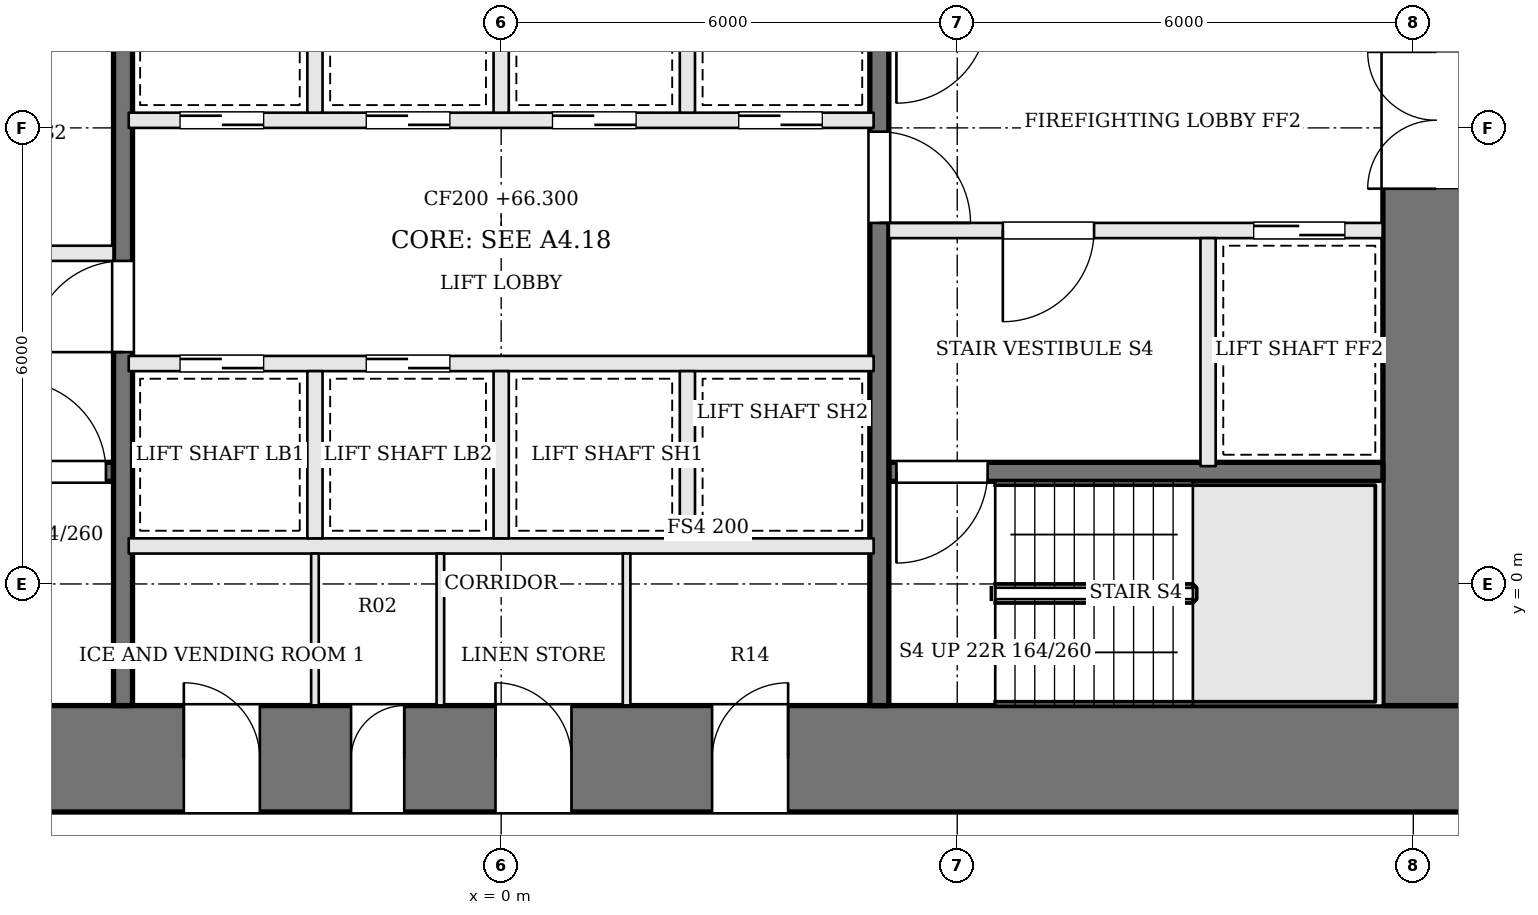
"""IFC4 building model, lengths in metres.
Left out: names, types, materials, properties, quantities, classifications, styles, units other than length and angle.
Written with IfcOpenShell. Run it as: python <this file> out.ifc"""

import sys

from ifc_helpers import new_model, si_unit, direction, frame, frame_2d, origin, place, context, subcontext, project, spatial, rectangle, extrude, element, fill, save


model = new_model("IFC4")
c1 = context("Model", 3, precision=1e-05, world=origin(), true_north=direction((0.0, 1.0)))
c2 = subcontext(c1, "Body", "Model", "MODEL_VIEW")
j1 = project(units=[si_unit("LENGTHUNIT", "METRE"), si_unit("PLANEANGLEUNIT", "RADIAN")], contexts=[c1])
p1 = place(None, origin())
s1 = spatial("IfcSite", under=j1, at=p1, CompositionType="ELEMENT")
p2 = place(p1, origin())
s2 = spatial("IfcBuilding", under=s1, at=p2, CompositionType="ELEMENT")
p3 = place(p2, frame((0.0, 0.0, 66.3)))
s3 = spatial("IfcBuildingStorey", under=s2, at=p3, CompositionType="ELEMENT", Elevation=66.3)
p4 = place(p3, frame((-13.0, -2.3, 0.0), z_axis=(0.0, 0.0, 1.0), x_axis=(1.0, 0.0, 0.0)))
e1 = element("IfcWall", 1, at=p4, inside=s3, PredefinedType="SHEAR", context=c2, shape_type="SweptSolid", body=[
    extrude(rectangle(XDim=26.0, YDim=1.4, at=frame_2d((13.0, 0.0))), origin(), (0.0, 0.0, 1.0), 3.6),
])
p5 = place(p4, frame((8.825, 0.0, 0.0)))
e2 = element("IfcOpeningElement", 2, at=p5, cuts=e1, PredefinedType="OPENING", context=c2, shape_type="SweptSolid", body=[
    extrude(rectangle(XDim=1.0, YDim=2.1, at=frame_2d((0.5, 1.05))), frame((0.0, 0.71, 0.0), z_axis=(0.0, -1.0, 0.0), x_axis=(1.0, 0.0, 0.0)), (0.0, 0.0, 1.0), 1.42),
])
p6 = place(p4, frame((11.025, 0.0, 0.0)))
e3 = element("IfcOpeningElement", 3, at=p6, cuts=e1, PredefinedType="OPENING", context=c2, shape_type="SweptSolid", body=[
    extrude(rectangle(XDim=0.7, YDim=2.1, at=frame_2d((0.35, 1.05))), frame((0.0, 0.71, 0.0), z_axis=(0.0, -1.0, 0.0), x_axis=(1.0, 0.0, 0.0)), (0.0, 0.0, 1.0), 1.42),
])
p7 = place(p4, frame((12.925, 0.0, 0.0)))
e4 = element("IfcOpeningElement", 4, at=p7, cuts=e1, PredefinedType="OPENING", context=c2, shape_type="SweptSolid", body=[
    extrude(rectangle(XDim=1.0, YDim=2.1, at=frame_2d((0.5, 1.05))), frame((0.0, 0.71, 0.0), z_axis=(0.0, -1.0, 0.0), x_axis=(1.0, 0.0, 0.0)), (0.0, 0.0, 1.0), 1.42),
])
p8 = place(p4, frame((15.775, 0.0, 0.0)))
e5 = element("IfcOpeningElement", 5, at=p8, cuts=e1, PredefinedType="OPENING", context=c2, shape_type="SweptSolid", body=[
    extrude(rectangle(XDim=1.0, YDim=2.1, at=frame_2d((0.5, 1.05))), frame((0.0, 0.71, 0.0), z_axis=(0.0, -1.0, 0.0), x_axis=(1.0, 0.0, 0.0)), (0.0, 0.0, 1.0), 1.42),
])
p9 = place(p3, frame((12.3, -1.6, 0.0), z_axis=(0.0, 0.0, 1.0), x_axis=(0.0, 1.0, 0.0)))
e6 = element("IfcWall", 6, at=p9, inside=s3, PredefinedType="SHEAR", context=c2, shape_type="SweptSolid", body=[
    extrude(rectangle(XDim=12.2, YDim=1.4, at=frame_2d((6.1, 0.0))), origin(), (0.0, 0.0, 1.0), 3.6),
])
p10 = place(p9, frame((6.8, 0.0, 0.0)))
e7 = element("IfcOpeningElement", 7, at=p10, cuts=e6, PredefinedType="OPENING", context=c2, shape_type="SweptSolid", body=[
    extrude(rectangle(XDim=1.8, YDim=2.1, at=frame_2d((0.9, 1.05))), frame((0.0, 0.71, 0.0), z_axis=(0.0, -1.0, 0.0), x_axis=(1.0, 0.0, 0.0)), (0.0, 0.0, 1.0), 1.42),
])
p11 = place(p3, frame((-11.6, 1.475, 0.0), z_axis=(0.0, 0.0, 1.0), x_axis=(1.0, 0.0, 0.0)))
e8 = element("IfcWall", 8, at=p11, inside=s3, PredefinedType="SOLIDWALL", context=c2, shape_type="SweptSolid", body=[
    extrude(rectangle(XDim=6.5, YDim=0.25, at=frame_2d((3.25, 0.0))), origin(), (0.0, 0.0, 1.0), 3.4),
])
p12 = place(p11, frame((5.2, 0.0, 0.0)))
e9 = element("IfcOpeningElement", 9, at=p12, cuts=e8, PredefinedType="OPENING", context=c2, shape_type="SweptSolid", body=[
    extrude(rectangle(XDim=1.2, YDim=2.1, at=frame_2d((0.6, 1.05))), frame((0.0, 0.135, 0.0), z_axis=(0.0, -1.0, 0.0), x_axis=(1.0, 0.0, 0.0)), (0.0, 0.0, 1.0), 0.27),
])
p13 = place(p3, frame((-11.6, 4.35, 0.0), z_axis=(0.0, 0.0, 1.0), x_axis=(1.0, 0.0, 0.0)))
e10 = element("IfcWall", 10, at=p13, inside=s3, PredefinedType="SOLIDWALL", context=c2, shape_type="SweptSolid", body=[
    extrude(rectangle(XDim=6.5, YDim=0.2, at=frame_2d((3.25, 0.0))), origin(), (0.0, 0.0, 1.0), 3.4),
])
p14 = place(p13, frame((3.8, 0.0, 0.0)))
e11 = element("IfcOpeningElement", 11, at=p14, cuts=e10, PredefinedType="OPENING", context=c2, shape_type="SweptSolid", body=[
    extrude(rectangle(XDim=1.2, YDim=2.1, at=frame_2d((0.6, 1.05))), frame((0.0, 0.11, 0.0), z_axis=(0.0, -1.0, 0.0), x_axis=(1.0, 0.0, 0.0)), (0.0, 0.0, 1.0), 0.22),
])
p15 = place(p13, frame((0.5, 0.0, 0.0)))
e12 = element("IfcOpeningElement", 12, at=p15, cuts=e10, PredefinedType="OPENING", context=c2, shape_type="SweptSolid", body=[
    extrude(rectangle(XDim=1.2, YDim=2.1, at=frame_2d((0.6, 1.05))), frame((0.0, 0.11, 0.0), z_axis=(0.0, -1.0, 0.0), x_axis=(1.0, 0.0, 0.0)), (0.0, 0.0, 1.0), 0.22),
])
p16 = place(p3, frame((11.6, 4.65, 0.0), z_axis=(0.0, 0.0, 1.0), x_axis=(-1.0, 0.0, 0.0)))
e13 = element("IfcWall", 13, at=p16, inside=s3, PredefinedType="SOLIDWALL", context=c2, shape_type="SweptSolid", body=[
    extrude(rectangle(XDim=6.5, YDim=0.2, at=frame_2d((3.25, 0.0))), origin(), (0.0, 0.0, 1.0), 3.4),
])
p17 = place(p16, frame((3.8, 0.0, 0.0)))
e14 = element("IfcOpeningElement", 14, at=p17, cuts=e13, PredefinedType="OPENING", context=c2, shape_type="SweptSolid", body=[
    extrude(rectangle(XDim=1.2, YDim=2.1, at=frame_2d((0.6, 1.05))), frame((0.0, 0.11, 0.0), z_axis=(0.0, -1.0, 0.0), x_axis=(1.0, 0.0, 0.0)), (0.0, 0.0, 1.0), 0.22),
])
p18 = place(p16, frame((0.5, 0.0, 0.0)))
e15 = element("IfcOpeningElement", 15, at=p18, cuts=e13, PredefinedType="OPENING", context=c2, shape_type="SweptSolid", body=[
    extrude(rectangle(XDim=1.2, YDim=2.1, at=frame_2d((0.6, 1.05))), frame((0.0, 0.11, 0.0), z_axis=(0.0, -1.0, 0.0), x_axis=(1.0, 0.0, 0.0)), (0.0, 0.0, 1.0), 0.22),
])
p19 = place(p3, frame((11.6, 1.475, 0.0), z_axis=(0.0, 0.0, 1.0), x_axis=(-1.0, 0.0, 0.0)))
e16 = element("IfcWall", 16, at=p19, inside=s3, PredefinedType="SOLIDWALL", context=c2, shape_type="SweptSolid", body=[
    extrude(rectangle(XDim=6.5, YDim=0.25, at=frame_2d((3.25, 0.0))), origin(), (0.0, 0.0, 1.0), 3.4),
])
p20 = place(p19, frame((5.2, 0.0, 0.0)))
e17 = element("IfcOpeningElement", 17, at=p20, cuts=e16, PredefinedType="OPENING", context=c2, shape_type="SweptSolid", body=[
    extrude(rectangle(XDim=1.2, YDim=2.1, at=frame_2d((0.6, 1.05))), frame((0.0, 0.135, 0.0), z_axis=(0.0, -1.0, 0.0), x_axis=(1.0, 0.0, 0.0)), (0.0, 0.0, 1.0), 0.27),
])
p21 = place(p3, frame((9.3, 4.55, 0.0), z_axis=(0.0, 0.0, 1.0), x_axis=(0.0, -1.0, 0.0)))
e18 = element("IfcWall", 18, at=p21, inside=s3, PredefinedType="SOLIDWALL", context=c2, shape_type="SweptSolid", body=[
    extrude(rectangle(XDim=3.0, YDim=0.2, at=frame_2d((1.5, 0.0))), origin(), (0.0, 0.0, 1.0), 3.4),
])
p22 = place(p3, frame((-4.975, -1.6, 0.0), z_axis=(0.0, 0.0, 1.0), x_axis=(0.0, 1.0, 0.0)))
e19 = element("IfcWall", 19, at=p22, inside=s3, PredefinedType="SOLIDWALL", context=c2, shape_type="SweptSolid", body=[
    extrude(rectangle(XDim=12.2, YDim=0.25, at=frame_2d((6.1, 0.0))), origin(), (0.0, 0.0, 1.0), 3.4),
])
p23 = place(p22, frame((4.65, 0.0, 0.0)))
e20 = element("IfcOpeningElement", 20, at=p23, cuts=e19, PredefinedType="OPENING", context=c2, shape_type="SweptSolid", body=[
    extrude(rectangle(XDim=1.2, YDim=2.1, at=frame_2d((0.6, 1.05))), frame((0.0, 0.135, 0.0), z_axis=(0.0, -1.0, 0.0), x_axis=(1.0, 0.0, 0.0)), (0.0, 0.0, 1.0), 0.27),
])
p24 = place(p3, frame((4.975, 10.6, 0.0), z_axis=(0.0, 0.0, 1.0), x_axis=(0.0, -1.0, 0.0)))
e21 = element("IfcWall", 21, at=p24, inside=s3, PredefinedType="SOLIDWALL", context=c2, shape_type="SweptSolid", body=[
    extrude(rectangle(XDim=12.2, YDim=0.25, at=frame_2d((6.1, 0.0))), origin(), (0.0, 0.0, 1.0), 3.4),
])
p25 = place(p24, frame((4.65, 0.0, 0.0)))
e22 = element("IfcOpeningElement", 22, at=p25, cuts=e21, PredefinedType="OPENING", context=c2, shape_type="SweptSolid", body=[
    extrude(rectangle(XDim=1.2, YDim=2.1, at=frame_2d((0.6, 1.05))), frame((0.0, 0.135, 0.0), z_axis=(0.0, -1.0, 0.0), x_axis=(1.0, 0.0, 0.0)), (0.0, 0.0, 1.0), 0.27),
])
p26 = place(p3, frame((-4.9, 0.5, 0.0), z_axis=(0.0, 0.0, 1.0), x_axis=(1.0, 0.0, 0.0)))
e23 = element("IfcWall", 23, at=p26, inside=s3, PredefinedType="SOLIDWALL", context=c2, shape_type="SweptSolid", body=[
    extrude(rectangle(XDim=9.8, YDim=0.2, at=frame_2d((4.9, 0.0))), origin(), (0.0, 0.0, 1.0), 3.4),
])
p27 = place(p3, frame((-4.9, 2.9, 0.0), z_axis=(0.0, 0.0, 1.0), x_axis=(1.0, 0.0, 0.0)))
e24 = element("IfcWall", 24, at=p27, inside=s3, PredefinedType="SOLIDWALL", context=c2, shape_type="SweptSolid", body=[
    extrude(rectangle(XDim=9.8, YDim=0.2, at=frame_2d((4.9, 0.0))), origin(), (0.0, 0.0, 1.0), 3.4),
])
p28 = place(p27, frame((0.675, 0.0, 0.0)))
e25 = element("IfcOpeningElement", 25, at=p28, cuts=e24, PredefinedType="OPENING", context=c2, shape_type="SweptSolid", body=[
    extrude(rectangle(XDim=1.1, YDim=2.1, at=frame_2d((0.55, 1.05))), frame((0.0, 0.11, 0.0), z_axis=(0.0, -1.0, 0.0), x_axis=(1.0, 0.0, 0.0)), (0.0, 0.0, 1.0), 0.22),
])
p29 = place(p27, frame((3.125, 0.0, 0.0)))
e26 = element("IfcOpeningElement", 26, at=p29, cuts=e24, PredefinedType="OPENING", context=c2, shape_type="SweptSolid", body=[
    extrude(rectangle(XDim=1.1, YDim=2.1, at=frame_2d((0.55, 1.05))), frame((0.0, 0.11, 0.0), z_axis=(0.0, -1.0, 0.0), x_axis=(1.0, 0.0, 0.0)), (0.0, 0.0, 1.0), 0.22),
])
p30 = place(p3, frame((-4.9, 6.1, 0.0), z_axis=(0.0, 0.0, 1.0), x_axis=(1.0, 0.0, 0.0)))
e27 = element("IfcWall", 27, at=p30, inside=s3, PredefinedType="SOLIDWALL", context=c2, shape_type="SweptSolid", body=[
    extrude(rectangle(XDim=9.8, YDim=0.2, at=frame_2d((4.9, 0.0))), origin(), (0.0, 0.0, 1.0), 3.4),
])
p31 = place(p30, frame((0.675, 0.0, 0.0)))
e28 = element("IfcOpeningElement", 28, at=p31, cuts=e27, PredefinedType="OPENING", context=c2, shape_type="SweptSolid", body=[
    extrude(rectangle(XDim=1.1, YDim=2.1, at=frame_2d((0.55, 1.05))), frame((0.0, 0.11, 0.0), z_axis=(0.0, -1.0, 0.0), x_axis=(1.0, 0.0, 0.0)), (0.0, 0.0, 1.0), 0.22),
])
p32 = place(p30, frame((3.125, 0.0, 0.0)))
e29 = element("IfcOpeningElement", 29, at=p32, cuts=e27, PredefinedType="OPENING", context=c2, shape_type="SweptSolid", body=[
    extrude(rectangle(XDim=1.1, YDim=2.1, at=frame_2d((0.55, 1.05))), frame((0.0, 0.11, 0.0), z_axis=(0.0, -1.0, 0.0), x_axis=(1.0, 0.0, 0.0)), (0.0, 0.0, 1.0), 0.22),
])
p33 = place(p30, frame((5.575, 0.0, 0.0)))
e30 = element("IfcOpeningElement", 30, at=p33, cuts=e27, PredefinedType="OPENING", context=c2, shape_type="SweptSolid", body=[
    extrude(rectangle(XDim=1.1, YDim=2.1, at=frame_2d((0.55, 1.05))), frame((0.0, 0.11, 0.0), z_axis=(0.0, -1.0, 0.0), x_axis=(1.0, 0.0, 0.0)), (0.0, 0.0, 1.0), 0.22),
])
p34 = place(p30, frame((8.025, 0.0, 0.0)))
e31 = element("IfcOpeningElement", 31, at=p34, cuts=e27, PredefinedType="OPENING", context=c2, shape_type="SweptSolid", body=[
    extrude(rectangle(XDim=1.1, YDim=2.1, at=frame_2d((0.55, 1.05))), frame((0.0, 0.11, 0.0), z_axis=(0.0, -1.0, 0.0), x_axis=(1.0, 0.0, 0.0)), (0.0, 0.0, 1.0), 0.22),
])
for number, where, z_axis, x_axis in (
    (32, (-2.45, 0.6, 0.0), (0.0, 0.0, 1.0), (0.0, 1.0, 0.0)),
    (33, (0.0, 0.6, 0.0), (0.0, 0.0, 1.0), (0.0, 1.0, 0.0)),
    (34, (2.45, 0.6, 0.0), (0.0, 0.0, 1.0), (0.0, 1.0, 0.0)),
    (35, (-2.45, 6.2, 0.0), (0.0, 0.0, 1.0), (0.0, 1.0, 0.0)),
    (36, (0.0, 6.2, 0.0), (0.0, 0.0, 1.0), (0.0, 1.0, 0.0)),
    (37, (2.45, 6.2, 0.0), (0.0, 0.0, 1.0), (0.0, 1.0, 0.0)),
):
    element("IfcWall", number, at=place(p3, frame(where, z_axis=z_axis, x_axis=x_axis)), inside=s3, PredefinedType="SOLIDWALL", context=c2, shape_type="SweptSolid", body=[
        extrude(rectangle(XDim=2.2, YDim=0.2, at=frame_2d((1.1, 0.0))), origin(), (0.0, 0.0, 1.0), 3.4),
    ])
for number, where, z_axis, x_axis in (
    (38, (-2.45, -1.6, 0.0), (0.0, 0.0, 1.0), (0.0, 1.0, 0.0)),
    (39, (-0.8, -1.6, 0.0), (0.0, 0.0, 1.0), (0.0, 1.0, 0.0)),
    (40, (1.65, -1.6, 0.0), (0.0, 0.0, 1.0), (0.0, 1.0, 0.0)),
):
    element("IfcWall", number, at=place(p3, frame(where, z_axis=z_axis, x_axis=x_axis)), inside=s3, PredefinedType="PARTITIONING", context=c2, shape_type="SweptSolid", body=[
        extrude(rectangle(XDim=2.0, YDim=0.1, at=frame_2d((1.0, 0.0))), origin(), (0.0, 0.0, 1.0), 3.4),
    ])
p35 = place(p10, origin())
e41 = element("IfcDoor", 41, at=p35, inside=s3, OperationType="DOUBLE_DOOR_SINGLE_SWING", PredefinedType="DOOR", context=c2, shape_type="SweptSolid", body=[
    extrude(rectangle(XDim=1.8, YDim=2.1, at=frame_2d((0.9, 1.05))), frame((0.0, 0.025, 0.0), z_axis=(0.0, -1.0, 0.0), x_axis=(1.0, 0.0, 0.0)), (0.0, 0.0, 1.0), 0.05),
])
fill(e7, e41)
p36 = place(p23, origin())
e42 = element("IfcDoor", 42, at=p36, inside=s3, OperationType="SINGLE_SWING_LEFT", PredefinedType="DOOR", context=c2, shape_type="SweptSolid", body=[
    extrude(rectangle(XDim=1.2, YDim=2.1, at=frame_2d((0.6, 1.05))), frame((0.0, 0.025, 0.0), z_axis=(0.0, -1.0, 0.0), x_axis=(1.0, 0.0, 0.0)), (0.0, 0.0, 1.0), 0.05),
])
fill(e20, e42)
p37 = place(p25, origin())
e43 = element("IfcDoor", 43, at=p37, inside=s3, OperationType="SINGLE_SWING_RIGHT", PredefinedType="DOOR", context=c2, shape_type="SweptSolid", body=[
    extrude(rectangle(XDim=1.2, YDim=2.1, at=frame_2d((0.6, 1.05))), frame((0.0, 0.025, 0.0), z_axis=(0.0, -1.0, 0.0), x_axis=(1.0, 0.0, 0.0)), (0.0, 0.0, 1.0), 0.05),
])
fill(e22, e43)
p38 = place(p17, origin())
e44 = element("IfcDoor", 44, at=p38, inside=s3, OperationType="SINGLE_SWING_RIGHT", PredefinedType="DOOR", context=c2, shape_type="SweptSolid", body=[
    extrude(rectangle(XDim=1.2, YDim=2.1, at=frame_2d((0.6, 1.05))), frame((0.0, 0.025, 0.0), z_axis=(0.0, -1.0, 0.0), x_axis=(1.0, 0.0, 0.0)), (0.0, 0.0, 1.0), 0.05),
])
fill(e14, e44)
p39 = place(p12, origin())
e45 = element("IfcDoor", 45, at=p39, inside=s3, OperationType="SINGLE_SWING_LEFT", PredefinedType="DOOR", context=c2, shape_type="SweptSolid", body=[
    extrude(rectangle(XDim=1.2, YDim=2.1, at=frame_2d((0.6, 1.05))), frame((0.0, 0.025, 0.0), z_axis=(0.0, -1.0, 0.0), x_axis=(1.0, 0.0, 0.0)), (0.0, 0.0, 1.0), 0.05),
])
fill(e9, e45)
p40 = place(p20, origin())
e46 = element("IfcDoor", 46, at=p40, inside=s3, OperationType="SINGLE_SWING_RIGHT", PredefinedType="DOOR", context=c2, shape_type="SweptSolid", body=[
    extrude(rectangle(XDim=1.2, YDim=2.1, at=frame_2d((0.6, 1.05))), frame((0.0, 0.025, 0.0), z_axis=(0.0, -1.0, 0.0), x_axis=(1.0, 0.0, 0.0)), (0.0, 0.0, 1.0), 0.05),
])
fill(e17, e46)
p41 = place(p18, origin())
e47 = element("IfcDoor", 47, at=p41, inside=s3, OperationType="SLIDING_TO_RIGHT", PredefinedType="DOOR", context=c2, shape_type="SweptSolid", body=[
    extrude(rectangle(XDim=1.2, YDim=2.1, at=frame_2d((0.6, 1.05))), frame((0.0, 0.025, 0.0), z_axis=(0.0, -1.0, 0.0), x_axis=(1.0, 0.0, 0.0)), (0.0, 0.0, 1.0), 0.05),
])
fill(e15, e47)
p42 = place(p28, origin())
e48 = element("IfcDoor", 48, at=p42, inside=s3, OperationType="SLIDING_TO_RIGHT", PredefinedType="DOOR", context=c2, shape_type="SweptSolid", body=[
    extrude(rectangle(XDim=1.1, YDim=2.1, at=frame_2d((0.55, 1.05))), frame((0.0, 0.025, 0.0), z_axis=(0.0, -1.0, 0.0), x_axis=(1.0, 0.0, 0.0)), (0.0, 0.0, 1.0), 0.05),
])
fill(e25, e48)
p43 = place(p29, origin())
e49 = element("IfcDoor", 49, at=p43, inside=s3, OperationType="SLIDING_TO_LEFT", PredefinedType="DOOR", context=c2, shape_type="SweptSolid", body=[
    extrude(rectangle(XDim=1.1, YDim=2.1, at=frame_2d((0.55, 1.05))), frame((0.0, 0.025, 0.0), z_axis=(0.0, -1.0, 0.0), x_axis=(1.0, 0.0, 0.0)), (0.0, 0.0, 1.0), 0.05),
])
fill(e26, e49)
p44 = place(p31, origin())
e50 = element("IfcDoor", 50, at=p44, inside=s3, OperationType="SLIDING_TO_RIGHT", PredefinedType="DOOR", context=c2, shape_type="SweptSolid", body=[
    extrude(rectangle(XDim=1.1, YDim=2.1, at=frame_2d((0.55, 1.05))), frame((0.0, 0.025, 0.0), z_axis=(0.0, -1.0, 0.0), x_axis=(1.0, 0.0, 0.0)), (0.0, 0.0, 1.0), 0.05),
])
fill(e28, e50)
p45 = place(p32, origin())
e51 = element("IfcDoor", 51, at=p45, inside=s3, OperationType="SLIDING_TO_LEFT", PredefinedType="DOOR", context=c2, shape_type="SweptSolid", body=[
    extrude(rectangle(XDim=1.1, YDim=2.1, at=frame_2d((0.55, 1.05))), frame((0.0, 0.025, 0.0), z_axis=(0.0, -1.0, 0.0), x_axis=(1.0, 0.0, 0.0)), (0.0, 0.0, 1.0), 0.05),
])
fill(e29, e51)
p46 = place(p33, origin())
e52 = element("IfcDoor", 52, at=p46, inside=s3, OperationType="SLIDING_TO_RIGHT", PredefinedType="DOOR", context=c2, shape_type="SweptSolid", body=[
    extrude(rectangle(XDim=1.1, YDim=2.1, at=frame_2d((0.55, 1.05))), frame((0.0, 0.025, 0.0), z_axis=(0.0, -1.0, 0.0), x_axis=(1.0, 0.0, 0.0)), (0.0, 0.0, 1.0), 0.05),
])
fill(e30, e52)
p47 = place(p34, origin())
e53 = element("IfcDoor", 53, at=p47, inside=s3, OperationType="SLIDING_TO_LEFT", PredefinedType="DOOR", context=c2, shape_type="SweptSolid", body=[
    extrude(rectangle(XDim=1.1, YDim=2.1, at=frame_2d((0.55, 1.05))), frame((0.0, 0.025, 0.0), z_axis=(0.0, -1.0, 0.0), x_axis=(1.0, 0.0, 0.0)), (0.0, 0.0, 1.0), 0.05),
])
fill(e31, e53)
p48 = place(p5, origin())
e54 = element("IfcDoor", 54, at=p48, inside=s3, OperationType="SINGLE_SWING_LEFT", PredefinedType="DOOR", context=c2, shape_type="SweptSolid", body=[
    extrude(rectangle(XDim=1.0, YDim=2.1, at=frame_2d((0.5, 1.05))), frame((0.0, 0.025, 0.0), z_axis=(0.0, -1.0, 0.0), x_axis=(1.0, 0.0, 0.0)), (0.0, 0.0, 1.0), 0.05),
])
fill(e2, e54)
p49 = place(p6, origin())
e55 = element("IfcDoor", 55, at=p49, inside=s3, OperationType="SINGLE_SWING_RIGHT", PredefinedType="DOOR", context=c2, shape_type="SweptSolid", body=[
    extrude(rectangle(XDim=0.7, YDim=2.1, at=frame_2d((0.35, 1.05))), frame((0.0, 0.025, 0.0), z_axis=(0.0, -1.0, 0.0), x_axis=(1.0, 0.0, 0.0)), (0.0, 0.0, 1.0), 0.05),
])
fill(e3, e55)
p50 = place(p7, origin())
e56 = element("IfcDoor", 56, at=p50, inside=s3, OperationType="SINGLE_SWING_LEFT", PredefinedType="DOOR", context=c2, shape_type="SweptSolid", body=[
    extrude(rectangle(XDim=1.0, YDim=2.1, at=frame_2d((0.5, 1.05))), frame((0.0, 0.025, 0.0), z_axis=(0.0, -1.0, 0.0), x_axis=(1.0, 0.0, 0.0)), (0.0, 0.0, 1.0), 0.05),
])
fill(e4, e56)
p51 = place(p8, origin())
e57 = element("IfcDoor", 57, at=p51, inside=s3, OperationType="SINGLE_SWING_RIGHT", PredefinedType="DOOR", context=c2, shape_type="SweptSolid", body=[
    extrude(rectangle(XDim=1.0, YDim=2.1, at=frame_2d((0.5, 1.05))), frame((0.0, 0.025, 0.0), z_axis=(0.0, -1.0, 0.0), x_axis=(1.0, 0.0, 0.0)), (0.0, 0.0, 1.0), 0.05),
])
fill(e5, e57)
save(model, sys.argv[1])
